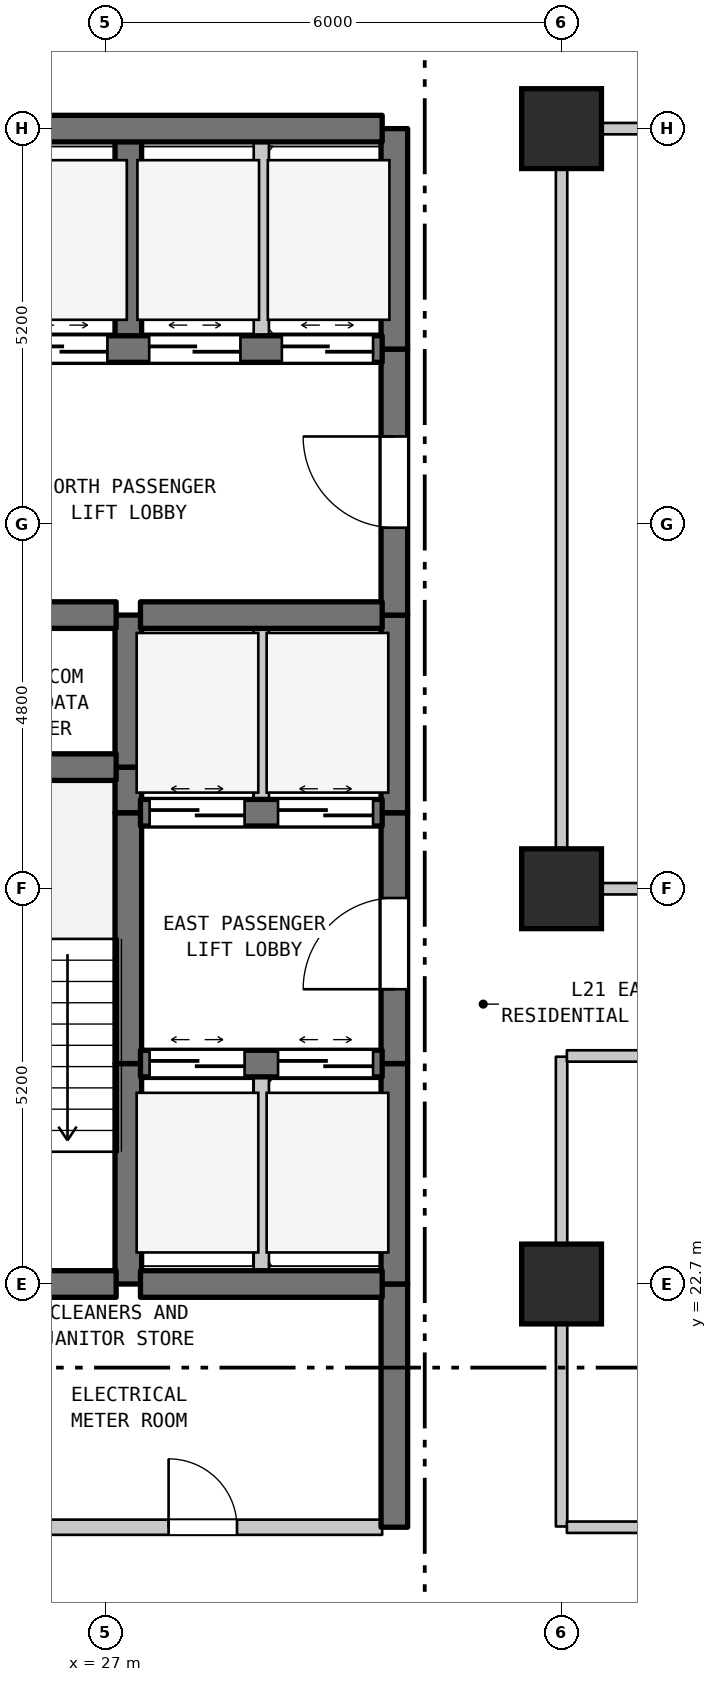
"""IFC4 building model, lengths in metres.
Left out: names, types, materials, properties, quantities, classifications, styles, units other than length and angle.
Written with IfcOpenShell. Run it as: python <this file> out.ifc"""

import sys

from ifc_helpers import new_model, si_unit, direction, frame, frame_2d, origin, origin_2d, place, context, subcontext, project, spatial, rectangle, extrude, element, fill, save


model = new_model("IFC4")
c1 = context("Model", 3, precision=1e-05, world=origin(), true_north=direction((0.0, 1.0)))
c2 = subcontext(c1, "Body", "Model", "MODEL_VIEW")
j1 = project(units=[si_unit("LENGTHUNIT", "METRE"), si_unit("PLANEANGLEUNIT", "RADIAN")], contexts=[c1])
p1 = place(None, origin())
s1 = spatial("IfcSite", under=j1, at=p1, CompositionType="ELEMENT")
p2 = place(p1, origin())
s2 = spatial("IfcBuilding", under=s1, at=p2, CompositionType="ELEMENT")
p3 = place(p2, frame((0.0, 0.0, 90.9)))
s3 = spatial("IfcBuildingStorey", under=s2, at=p3, CompositionType="ELEMENT", Elevation=90.9)
for number, where, z_axis, x_axis in (
    (1, (33.0, 22.7, 0.0), (0.0, 0.0, 1.0), (1.0, 0.0, 0.0)),
    (2, (33.0, 27.9, 0.0), (0.0, 0.0, 1.0), (1.0, 0.0, 0.0)),
    (3, (33.0, 37.9, 0.0), (0.0, 0.0, 1.0), (1.0, 0.0, 0.0)),
):
    element("IfcColumn", number, at=place(p3, frame(where, z_axis=z_axis, x_axis=x_axis)), inside=s3, PredefinedType="COLUMN", context=c2, shape_type="SweptSolid", body=[
        extrude(rectangle(XDim=1.05, YDim=1.05, at=origin_2d()), origin(), (0.0, 0.0, 1.0), 3.7),
    ])
p4 = place(p3, frame((27.3, 22.7, 0.0), z_axis=(0.0, 0.0, 1.0), x_axis=(0.0, 1.0, 0.0)))
e4 = element("IfcWall", 4, at=p4, inside=s3, PredefinedType="SHEAR", context=c2, shape_type="SweptSolid", body=[
    extrude(rectangle(XDim=2.9, YDim=0.35, at=frame_2d((1.45, 0.0))), origin(), (0.0, 0.0, 1.0), 3.385),
])
p5 = place(p3, frame((27.3, 25.6, 0.0), z_axis=(0.0, 0.0, 1.0), x_axis=(0.0, 1.0, 0.0)))
e5 = element("IfcWall", 5, at=p5, inside=s3, PredefinedType="SHEAR", context=c2, shape_type="SweptSolid", body=[
    extrude(rectangle(XDim=3.3, YDim=0.35, at=frame_2d((1.65, 0.0))), origin(), (0.0, 0.0, 1.0), 3.385),
])
p6 = place(p3, frame((27.3, 28.9, 0.0), z_axis=(0.0, 0.0, 1.0), x_axis=(0.0, 1.0, 0.0)))
e6 = element("IfcWall", 6, at=p6, inside=s3, PredefinedType="SHEAR", context=c2, shape_type="SweptSolid", body=[
    extrude(rectangle(XDim=0.6, YDim=0.35, at=frame_2d((0.3, 0.0))), origin(), (0.0, 0.0, 1.0), 3.385),
])
p7 = place(p3, frame((27.3, 29.5, 0.0), z_axis=(0.0, 0.0, 1.0), x_axis=(0.0, 1.0, 0.0)))
e7 = element("IfcWall", 7, at=p7, inside=s3, PredefinedType="SHEAR", context=c2, shape_type="SweptSolid", body=[
    extrude(rectangle(XDim=2.0, YDim=0.35, at=frame_2d((1.0, 0.0))), origin(), (0.0, 0.0, 1.0), 3.385),
])
p8 = place(p3, frame((27.3, 35.0, 0.0), z_axis=(0.0, 0.0, 1.0), x_axis=(0.0, 1.0, 0.0)))
e8 = element("IfcWall", 8, at=p8, inside=s3, PredefinedType="SHEAR", context=c2, shape_type="SweptSolid", body=[
    extrude(rectangle(XDim=2.9, YDim=0.35, at=frame_2d((1.45, 0.0))), origin(), (0.0, 0.0, 1.0), 3.385),
])
p9 = place(p3, frame((29.05, 22.7, 0.0), z_axis=(0.0, 0.0, 1.0), x_axis=(0.0, 1.0, 0.0)))
e9 = element("IfcWall", 9, at=p9, inside=s3, PredefinedType="STANDARD", context=c2, shape_type="SweptSolid", body=[
    extrude(rectangle(XDim=2.9, YDim=0.2, at=frame_2d((1.45, 0.0))), origin(), (0.0, 0.0, 1.0), 3.385),
])
p10 = place(p3, frame((29.05, 28.9, 0.0), z_axis=(0.0, 0.0, 1.0), x_axis=(0.0, 1.0, 0.0)))
e10 = element("IfcWall", 10, at=p10, inside=s3, PredefinedType="STANDARD", context=c2, shape_type="SweptSolid", body=[
    extrude(rectangle(XDim=2.6, YDim=0.2, at=frame_2d((1.3, 0.0))), origin(), (0.0, 0.0, 1.0), 3.385),
])
p11 = place(p3, frame((29.05, 35.0, 0.0), z_axis=(0.0, 0.0, 1.0), x_axis=(0.0, 1.0, 0.0)))
e11 = element("IfcWall", 11, at=p11, inside=s3, PredefinedType="STANDARD", context=c2, shape_type="SweptSolid", body=[
    extrude(rectangle(XDim=2.9, YDim=0.2, at=frame_2d((1.45, 0.0))), origin(), (0.0, 0.0, 1.0), 3.385),
])
p12 = place(p3, frame((30.8, 19.5, 0.0), z_axis=(0.0, 0.0, 1.0), x_axis=(0.0, 1.0, 0.0)))
e12 = element("IfcWall", 12, at=p12, inside=s3, PredefinedType="SHEAR", context=c2, shape_type="SweptSolid", body=[
    extrude(rectangle(XDim=3.2, YDim=0.35, at=frame_2d((1.6, 0.0))), origin(), (0.0, 0.0, 1.0), 3.385),
])
p13 = place(p3, frame((30.8, 22.7, 0.0), z_axis=(0.0, 0.0, 1.0), x_axis=(0.0, 1.0, 0.0)))
e13 = element("IfcWall", 13, at=p13, inside=s3, PredefinedType="SHEAR", context=c2, shape_type="SweptSolid", body=[
    extrude(rectangle(XDim=2.9, YDim=0.35, at=frame_2d((1.45, 0.0))), origin(), (0.0, 0.0, 1.0), 3.385),
])
p14 = place(p3, frame((30.8, 25.6, 0.0), z_axis=(0.0, 0.0, 1.0), x_axis=(0.0, 1.0, 0.0)))
e14 = element("IfcWall", 14, at=p14, inside=s3, PredefinedType="SHEAR", context=c2, shape_type="SweptSolid", body=[
    extrude(rectangle(XDim=3.3, YDim=0.35, at=frame_2d((1.65, 0.0))), origin(), (0.0, 0.0, 1.0), 3.385),
])
p15 = place(p14, frame((0.978, 0.0, 0.0)))
e15 = element("IfcOpeningElement", 15, at=p15, cuts=e14, PredefinedType="OPENING", context=c2, shape_type="SweptSolid", body=[
    extrude(rectangle(XDim=1.2, YDim=2.2, at=frame_2d((0.6, 1.1))), frame((0.0, 0.185, 0.0), z_axis=(0.0, -1.0, 0.0), x_axis=(1.0, 0.0, 0.0)), (0.0, 0.0, 1.0), 0.37),
])
p16 = place(p3, frame((30.8, 28.9, 0.0), z_axis=(0.0, 0.0, 1.0), x_axis=(0.0, 1.0, 0.0)))
e16 = element("IfcWall", 16, at=p16, inside=s3, PredefinedType="SHEAR", context=c2, shape_type="SweptSolid", body=[
    extrude(rectangle(XDim=2.6, YDim=0.35, at=frame_2d((1.3, 0.0))), origin(), (0.0, 0.0, 1.0), 3.385),
])
p17 = place(p3, frame((30.8, 31.5, 0.0), z_axis=(0.0, 0.0, 1.0), x_axis=(0.0, 1.0, 0.0)))
e17 = element("IfcWall", 17, at=p17, inside=s3, PredefinedType="SHEAR", context=c2, shape_type="SweptSolid", body=[
    extrude(rectangle(XDim=3.5, YDim=0.35, at=frame_2d((1.75, 0.0))), origin(), (0.0, 0.0, 1.0), 3.385),
])
p18 = place(p17, frame((1.15, 0.0, 0.0)))
e18 = element("IfcOpeningElement", 18, at=p18, cuts=e17, PredefinedType="OPENING", context=c2, shape_type="SweptSolid", body=[
    extrude(rectangle(XDim=1.2, YDim=2.2, at=frame_2d((0.6, 1.1))), frame((0.0, 0.185, 0.0), z_axis=(0.0, -1.0, 0.0), x_axis=(1.0, 0.0, 0.0)), (0.0, 0.0, 1.0), 0.37),
])
p19 = place(p3, frame((30.8, 35.0, 0.0), z_axis=(0.0, 0.0, 1.0), x_axis=(0.0, 1.0, 0.0)))
e19 = element("IfcWall", 19, at=p19, inside=s3, PredefinedType="SHEAR", context=c2, shape_type="SweptSolid", body=[
    extrude(rectangle(XDim=2.9, YDim=0.35, at=frame_2d((1.45, 0.0))), origin(), (0.0, 0.0, 1.0), 3.385),
])
p20 = place(p3, frame((33.0, 19.51, 0.0), z_axis=(0.0, 0.0, 1.0), x_axis=(0.0, 1.0, 0.0)))
e20 = element("IfcWall", 20, at=p20, inside=s3, PredefinedType="STANDARD", context=c2, shape_type="SweptSolid", body=[
    extrude(rectangle(XDim=6.18, YDim=0.15, at=frame_2d((3.09, 0.0))), origin(), (0.0, 0.0, 1.0), 2.935),
])
p21 = place(p3, frame((33.0, 27.91, 0.0), z_axis=(0.0, 0.0, 1.0), x_axis=(0.0, 1.0, 0.0)))
e21 = element("IfcWall", 21, at=p21, inside=s3, PredefinedType="STANDARD", context=c2, shape_type="SweptSolid", body=[
    extrude(rectangle(XDim=9.98, YDim=0.15, at=frame_2d((4.99, 0.0))), origin(), (0.0, 0.0, 1.0), 2.885),
])
p22 = place(p3, frame((25.985, 19.5, 0.0), z_axis=(0.0, 0.0, 1.0), x_axis=(1.0, 0.0, 0.0)))
e22 = element("IfcWall", 22, at=p22, inside=s3, PredefinedType="STANDARD", context=c2, shape_type="SweptSolid", body=[
    extrude(rectangle(XDim=4.655, YDim=0.2, at=frame_2d((2.327, 0.0))), origin(), (0.0, 0.0, 1.0), 3.385),
])
p23 = place(p22, frame((1.845, 0.0, 0.0)))
e23 = element("IfcOpeningElement", 23, at=p23, cuts=e22, PredefinedType="OPENING", context=c2, shape_type="SweptSolid", body=[
    extrude(rectangle(XDim=0.9, YDim=2.15, at=frame_2d((0.45, 1.075))), frame((0.0, 0.11, 0.0), z_axis=(0.0, -1.0, 0.0), x_axis=(1.0, 0.0, 0.0)), (0.0, 0.0, 1.0), 0.22),
])
p24 = place(p3, frame((33.07, 19.5, 0.0), z_axis=(0.0, 0.0, 1.0), x_axis=(1.0, 0.0, 0.0)))
e24 = element("IfcWall", 24, at=p24, inside=s3, PredefinedType="STANDARD", context=c2, shape_type="SweptSolid", body=[
    extrude(rectangle(XDim=21.51, YDim=0.15, at=frame_2d((10.755, 0.0))), origin(), (0.0, 0.0, 1.0), 3.385),
])
p25 = place(p3, frame((25.985, 22.7, 0.0), z_axis=(0.0, 0.0, 1.0), x_axis=(1.0, 0.0, 0.0)))
e25 = element("IfcWall", 25, at=p25, inside=s3, PredefinedType="SHEAR", context=c2, shape_type="SweptSolid", body=[
    extrude(rectangle(XDim=1.155, YDim=0.35, at=frame_2d((0.577, 0.0))), origin(), (0.0, 0.0, 1.0), 3.385),
])
p26 = place(p3, frame((27.46, 22.7, 0.0), z_axis=(0.0, 0.0, 1.0), x_axis=(1.0, 0.0, 0.0)))
e26 = element("IfcWall", 26, at=p26, inside=s3, PredefinedType="SHEAR", context=c2, shape_type="SweptSolid", body=[
    extrude(rectangle(XDim=3.18, YDim=0.35, at=frame_2d((1.59, 0.0))), origin(), (0.0, 0.0, 1.0), 3.385),
])
p27 = place(p3, frame((27.46, 25.6, 0.0), z_axis=(0.0, 0.0, 1.0), x_axis=(1.0, 0.0, 0.0)))
e27 = element("IfcWall", 27, at=p27, inside=s3, PredefinedType="SHEAR", context=c2, shape_type="SweptSolid", body=[
    extrude(rectangle(XDim=3.18, YDim=0.35, at=frame_2d((1.59, 0.0))), origin(), (0.0, 0.0, 1.0), 3.385),
])
p28 = place(p27, frame((0.12, 0.0, 0.0)))
e28 = element("IfcOpeningElement", 28, at=p28, cuts=e27, PredefinedType="OPENING", context=c2, shape_type="SweptSolid", body=[
    extrude(rectangle(XDim=1.25, YDim=2.2, at=frame_2d((0.625, 1.1))), frame((0.0, 0.185, 0.0), z_axis=(0.0, -1.0, 0.0), x_axis=(1.0, 0.0, 0.0)), (0.0, 0.0, 1.0), 0.37),
])
p29 = place(p27, frame((1.81, 0.0, 0.0)))
e29 = element("IfcOpeningElement", 29, at=p29, cuts=e27, PredefinedType="OPENING", context=c2, shape_type="SweptSolid", body=[
    extrude(rectangle(XDim=1.25, YDim=2.2, at=frame_2d((0.625, 1.1))), frame((0.0, 0.185, 0.0), z_axis=(0.0, -1.0, 0.0), x_axis=(1.0, 0.0, 0.0)), (0.0, 0.0, 1.0), 0.37),
])
p30 = place(p3, frame((33.07, 25.7, 0.0), z_axis=(0.0, 0.0, 1.0), x_axis=(1.0, 0.0, 0.0)))
e30 = element("IfcWall", 30, at=p30, inside=s3, PredefinedType="STANDARD", context=c2, shape_type="SweptSolid", body=[
    extrude(rectangle(XDim=21.51, YDim=0.15, at=frame_2d((10.755, 0.0))), origin(), (0.0, 0.0, 1.0), 3.385),
])
p31 = place(p3, frame((33.07, 27.9, 0.0), z_axis=(0.0, 0.0, 1.0), x_axis=(1.0, 0.0, 0.0)))
e31 = element("IfcWall", 31, at=p31, inside=s3, PredefinedType="STANDARD", context=c2, shape_type="SweptSolid", body=[
    extrude(rectangle(XDim=11.93, YDim=0.15, at=frame_2d((5.965, 0.0))), origin(), (0.0, 0.0, 1.0), 2.885),
])
p32 = place(p31, frame((10.185, 0.0, 0.0)))
e32 = element("IfcOpeningElement", 32, at=p32, cuts=e31, PredefinedType="OPENING", context=c2, shape_type="SweptSolid", body=[
    extrude(rectangle(XDim=1.0, YDim=2.15, at=frame_2d((0.5, 1.075))), frame((0.0, 0.085, 0.0), z_axis=(0.0, -1.0, 0.0), x_axis=(1.0, 0.0, 0.0)), (0.0, 0.0, 1.0), 0.17),
])
p33 = place(p3, frame((27.46, 28.9, 0.0), z_axis=(0.0, 0.0, 1.0), x_axis=(1.0, 0.0, 0.0)))
e33 = element("IfcWall", 33, at=p33, inside=s3, PredefinedType="SHEAR", context=c2, shape_type="SweptSolid", body=[
    extrude(rectangle(XDim=3.18, YDim=0.35, at=frame_2d((1.59, 0.0))), origin(), (0.0, 0.0, 1.0), 3.385),
])
p34 = place(p33, frame((0.12, 0.0, 0.0)))
e34 = element("IfcOpeningElement", 34, at=p34, cuts=e33, PredefinedType="OPENING", context=c2, shape_type="SweptSolid", body=[
    extrude(rectangle(XDim=1.25, YDim=2.2, at=frame_2d((0.625, 1.1))), frame((0.0, 0.185, 0.0), z_axis=(0.0, -1.0, 0.0), x_axis=(1.0, 0.0, 0.0)), (0.0, 0.0, 1.0), 0.37),
])
p35 = place(p33, frame((1.81, 0.0, 0.0)))
e35 = element("IfcOpeningElement", 35, at=p35, cuts=e33, PredefinedType="OPENING", context=c2, shape_type="SweptSolid", body=[
    extrude(rectangle(XDim=1.25, YDim=2.2, at=frame_2d((0.625, 1.1))), frame((0.0, 0.185, 0.0), z_axis=(0.0, -1.0, 0.0), x_axis=(1.0, 0.0, 0.0)), (0.0, 0.0, 1.0), 0.37),
])
p36 = place(p3, frame((23.96, 29.5, 0.0), z_axis=(0.0, 0.0, 1.0), x_axis=(1.0, 0.0, 0.0)))
e36 = element("IfcWall", 36, at=p36, inside=s3, PredefinedType="SHEAR", context=c2, shape_type="SweptSolid", body=[
    extrude(rectangle(XDim=3.18, YDim=0.35, at=frame_2d((1.59, 0.0))), origin(), (0.0, 0.0, 1.0), 3.385),
])
p37 = place(p3, frame((23.96, 31.5, 0.0), z_axis=(0.0, 0.0, 1.0), x_axis=(1.0, 0.0, 0.0)))
e37 = element("IfcWall", 37, at=p37, inside=s3, PredefinedType="SHEAR", context=c2, shape_type="SweptSolid", body=[
    extrude(rectangle(XDim=3.18, YDim=0.35, at=frame_2d((1.59, 0.0))), origin(), (0.0, 0.0, 1.0), 3.385),
])
p38 = place(p37, frame((1.094, 0.0, 0.0)))
e38 = element("IfcOpeningElement", 38, at=p38, cuts=e37, PredefinedType="OPENING", context=c2, shape_type="SweptSolid", body=[
    extrude(rectangle(XDim=0.85, YDim=2.1, at=frame_2d((0.425, 1.05))), frame((0.0, 0.185, 0.0), z_axis=(0.0, -1.0, 0.0), x_axis=(1.0, 0.0, 0.0)), (0.0, 0.0, 1.0), 0.37),
])
p39 = place(p3, frame((27.46, 31.5, 0.0), z_axis=(0.0, 0.0, 1.0), x_axis=(1.0, 0.0, 0.0)))
e39 = element("IfcWall", 39, at=p39, inside=s3, PredefinedType="SHEAR", context=c2, shape_type="SweptSolid", body=[
    extrude(rectangle(XDim=3.18, YDim=0.35, at=frame_2d((1.59, 0.0))), origin(), (0.0, 0.0, 1.0), 3.385),
])
p40 = place(p3, frame((19.16, 35.0, 0.0), z_axis=(0.0, 0.0, 1.0), x_axis=(1.0, 0.0, 0.0)))
e40 = element("IfcWall", 40, at=p40, inside=s3, PredefinedType="SHEAR", context=c2, shape_type="SweptSolid", body=[
    extrude(rectangle(XDim=11.48, YDim=0.35, at=frame_2d((5.74, 0.0))), origin(), (0.0, 0.0, 1.0), 3.385),
])
p41 = place(p40, frame((0.365, 0.0, 0.0)))
e41 = element("IfcOpeningElement", 41, at=p41, cuts=e40, PredefinedType="OPENING", context=c2, shape_type="SweptSolid", body=[
    extrude(rectangle(XDim=1.35, YDim=2.2, at=frame_2d((0.675, 1.1))), frame((0.0, 0.185, 0.0), z_axis=(0.0, -1.0, 0.0), x_axis=(1.0, 0.0, 0.0)), (0.0, 0.0, 1.0), 0.37),
])
p42 = place(p40, frame((2.765, 0.0, 0.0)))
e42 = element("IfcOpeningElement", 42, at=p42, cuts=e40, PredefinedType="OPENING", context=c2, shape_type="SweptSolid", body=[
    extrude(rectangle(XDim=1.35, YDim=2.2, at=frame_2d((0.675, 1.1))), frame((0.0, 0.185, 0.0), z_axis=(0.0, -1.0, 0.0), x_axis=(1.0, 0.0, 0.0)), (0.0, 0.0, 1.0), 0.37),
])
p43 = place(p40, frame((4.915, 0.0, 0.0)))
e43 = element("IfcOpeningElement", 43, at=p43, cuts=e40, PredefinedType="OPENING", context=c2, shape_type="SweptSolid", body=[
    extrude(rectangle(XDim=1.2, YDim=2.2, at=frame_2d((0.6, 1.1))), frame((0.0, 0.185, 0.0), z_axis=(0.0, -1.0, 0.0), x_axis=(1.0, 0.0, 0.0)), (0.0, 0.0, 1.0), 0.37),
])
p44 = place(p40, frame((6.665, 0.0, 0.0)))
e44 = element("IfcOpeningElement", 44, at=p44, cuts=e40, PredefinedType="OPENING", context=c2, shape_type="SweptSolid", body=[
    extrude(rectangle(XDim=1.2, YDim=2.2, at=frame_2d((0.6, 1.1))), frame((0.0, 0.185, 0.0), z_axis=(0.0, -1.0, 0.0), x_axis=(1.0, 0.0, 0.0)), (0.0, 0.0, 1.0), 0.37),
])
p45 = place(p40, frame((8.415, 0.0, 0.0)))
e45 = element("IfcOpeningElement", 45, at=p45, cuts=e40, PredefinedType="OPENING", context=c2, shape_type="SweptSolid", body=[
    extrude(rectangle(XDim=1.2, YDim=2.2, at=frame_2d((0.6, 1.1))), frame((0.0, 0.185, 0.0), z_axis=(0.0, -1.0, 0.0), x_axis=(1.0, 0.0, 0.0)), (0.0, 0.0, 1.0), 0.37),
])
p46 = place(p40, frame((10.16, 0.0, 0.0)))
e46 = element("IfcOpeningElement", 46, at=p46, cuts=e40, PredefinedType="OPENING", context=c2, shape_type="SweptSolid", body=[
    extrude(rectangle(XDim=1.2, YDim=2.2, at=frame_2d((0.6, 1.1))), frame((0.0, 0.185, 0.0), z_axis=(0.0, -1.0, 0.0), x_axis=(1.0, 0.0, 0.0)), (0.0, 0.0, 1.0), 0.37),
])
p47 = place(p3, frame((19.16, 37.9, 0.0), z_axis=(0.0, 0.0, 1.0), x_axis=(1.0, 0.0, 0.0)))
e47 = element("IfcWall", 47, at=p47, inside=s3, PredefinedType="SHEAR", context=c2, shape_type="SweptSolid", body=[
    extrude(rectangle(XDim=11.48, YDim=0.35, at=frame_2d((5.74, 0.0))), origin(), (0.0, 0.0, 1.0), 3.385),
])
p48 = place(p3, frame((33.07, 37.9, 0.0), z_axis=(0.0, 0.0, 1.0), x_axis=(1.0, 0.0, 0.0)))
e48 = element("IfcWall", 48, at=p48, inside=s3, PredefinedType="STANDARD", context=c2, shape_type="SweptSolid", body=[
    extrude(rectangle(XDim=26.935, YDim=0.15, at=frame_2d((13.467, 0.0))), origin(), (0.0, 0.0, 1.0), 3.385),
])
p49 = place(p48, frame((12.96, 0.0, 0.0)))
e49 = element("IfcOpeningElement", 49, at=p49, cuts=e48, PredefinedType="OPENING", context=c2, shape_type="SweptSolid", body=[
    extrude(rectangle(XDim=1.0, YDim=2.15, at=frame_2d((0.5, 1.075))), frame((0.0, 0.085, 0.0), z_axis=(0.0, -1.0, 0.0), x_axis=(1.0, 0.0, 0.0)), (0.0, 0.0, 1.0), 0.17),
])
p50 = place(p15, origin())
e50 = element("IfcDoor", 50, at=p50, inside=s3, OperationType="SINGLE_SWING_LEFT", PredefinedType="DOOR", context=c2, shape_type="SweptSolid", body=[
    extrude(rectangle(XDim=1.2, YDim=2.2, at=frame_2d((0.6, 1.1))), frame((0.0, 0.025, 0.0), z_axis=(0.0, -1.0, 0.0), x_axis=(1.0, 0.0, 0.0)), (0.0, 0.0, 1.0), 0.05),
])
fill(e15, e50)
p51 = place(p18, origin())
e51 = element("IfcDoor", 51, at=p51, inside=s3, OperationType="SINGLE_SWING_RIGHT", PredefinedType="DOOR", context=c2, shape_type="SweptSolid", body=[
    extrude(rectangle(XDim=1.2, YDim=2.2, at=frame_2d((0.6, 1.1))), frame((0.0, 0.025, 0.0), z_axis=(0.0, -1.0, 0.0), x_axis=(1.0, 0.0, 0.0)), (0.0, 0.0, 1.0), 0.05),
])
fill(e18, e51)
p52 = place(p23, origin())
e52 = element("IfcDoor", 52, at=p52, inside=s3, OperationType="SINGLE_SWING_LEFT", PredefinedType="DOOR", context=c2, shape_type="SweptSolid", body=[
    extrude(rectangle(XDim=0.9, YDim=2.15, at=frame_2d((0.45, 1.075))), frame((0.0, 0.025, 0.0), z_axis=(0.0, -1.0, 0.0), x_axis=(1.0, 0.0, 0.0)), (0.0, 0.0, 1.0), 0.05),
])
fill(e23, e52)
p53 = place(p28, origin())
e53 = element("IfcDoor", 53, at=p53, inside=s3, OperationType="DOUBLE_DOOR_SLIDING", PredefinedType="DOOR", context=c2, shape_type="SweptSolid", body=[
    extrude(rectangle(XDim=1.25, YDim=2.2, at=frame_2d((0.625, 1.1))), frame((0.0, 0.025, 0.0), z_axis=(0.0, -1.0, 0.0), x_axis=(1.0, 0.0, 0.0)), (0.0, 0.0, 1.0), 0.05),
])
fill(e28, e53)
p54 = place(p29, origin())
e54 = element("IfcDoor", 54, at=p54, inside=s3, OperationType="DOUBLE_DOOR_SLIDING", PredefinedType="DOOR", context=c2, shape_type="SweptSolid", body=[
    extrude(rectangle(XDim=1.25, YDim=2.2, at=frame_2d((0.625, 1.1))), frame((0.0, 0.025, 0.0), z_axis=(0.0, -1.0, 0.0), x_axis=(1.0, 0.0, 0.0)), (0.0, 0.0, 1.0), 0.05),
])
fill(e29, e54)
p55 = place(p34, origin())
e55 = element("IfcDoor", 55, at=p55, inside=s3, OperationType="DOUBLE_DOOR_SLIDING", PredefinedType="DOOR", context=c2, shape_type="SweptSolid", body=[
    extrude(rectangle(XDim=1.25, YDim=2.2, at=frame_2d((0.625, 1.1))), frame((0.0, 0.025, 0.0), z_axis=(0.0, -1.0, 0.0), x_axis=(1.0, 0.0, 0.0)), (0.0, 0.0, 1.0), 0.05),
])
fill(e34, e55)
p56 = place(p35, origin())
e56 = element("IfcDoor", 56, at=p56, inside=s3, OperationType="DOUBLE_DOOR_SLIDING", PredefinedType="DOOR", context=c2, shape_type="SweptSolid", body=[
    extrude(rectangle(XDim=1.25, YDim=2.2, at=frame_2d((0.625, 1.1))), frame((0.0, 0.025, 0.0), z_axis=(0.0, -1.0, 0.0), x_axis=(1.0, 0.0, 0.0)), (0.0, 0.0, 1.0), 0.05),
])
fill(e35, e56)
p57 = place(p44, origin())
e57 = element("IfcDoor", 57, at=p57, inside=s3, OperationType="DOUBLE_DOOR_SLIDING", PredefinedType="DOOR", context=c2, shape_type="SweptSolid", body=[
    extrude(rectangle(XDim=1.2, YDim=2.2, at=frame_2d((0.6, 1.1))), frame((0.0, 0.025, 0.0), z_axis=(0.0, -1.0, 0.0), x_axis=(1.0, 0.0, 0.0)), (0.0, 0.0, 1.0), 0.05),
])
fill(e44, e57)
p58 = place(p45, origin())
e58 = element("IfcDoor", 58, at=p58, inside=s3, OperationType="DOUBLE_DOOR_SLIDING", PredefinedType="DOOR", context=c2, shape_type="SweptSolid", body=[
    extrude(rectangle(XDim=1.2, YDim=2.2, at=frame_2d((0.6, 1.1))), frame((0.0, 0.025, 0.0), z_axis=(0.0, -1.0, 0.0), x_axis=(1.0, 0.0, 0.0)), (0.0, 0.0, 1.0), 0.05),
])
fill(e45, e58)
p59 = place(p46, origin())
e59 = element("IfcDoor", 59, at=p59, inside=s3, OperationType="DOUBLE_DOOR_SLIDING", PredefinedType="DOOR", context=c2, shape_type="SweptSolid", body=[
    extrude(rectangle(XDim=1.2, YDim=2.2, at=frame_2d((0.6, 1.1))), frame((0.0, 0.025, 0.0), z_axis=(0.0, -1.0, 0.0), x_axis=(1.0, 0.0, 0.0)), (0.0, 0.0, 1.0), 0.05),
])
fill(e46, e59)
save(model, sys.argv[1])
